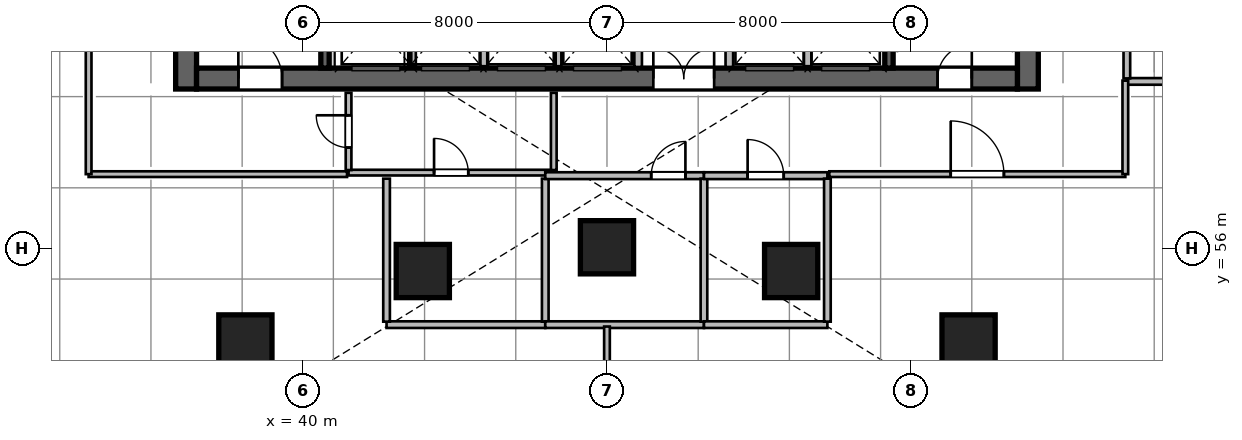
"""IFC4 building model, lengths in metres.
Left out: names, types, materials, properties, quantities, classifications, styles, units other than length and angle.
Written with IfcOpenShell. Run it as: python <this file> out.ifc"""

import sys

from ifc_helpers import new_model, si_unit, direction, frame, frame_2d, origin, origin_2d, place, context, subcontext, project, spatial, rectangle, circle, extrude, source, transform, mapped, element, fill, save


model = new_model("IFC4")
c1 = context("Model", 3, precision=1e-05, world=origin(), true_north=direction((0.0, 1.0)))
c2 = subcontext(c1, "Body", "Model", "MODEL_VIEW")
j1 = project(units=[si_unit("LENGTHUNIT", "METRE"), si_unit("PLANEANGLEUNIT", "RADIAN")], contexts=[c1])
p1 = place(None, origin())
s1 = spatial("IfcSite", under=j1, at=p1, CompositionType="ELEMENT")
p2 = place(p1, origin())
s2 = spatial("IfcBuilding", under=s1, at=p2, CompositionType="ELEMENT")
p3 = place(p2, frame((0.0, 0.0, 30.0)))
s3 = spatial("IfcBuildingStorey", under=s2, at=p3, CompositionType="ELEMENT", Elevation=30.0)
m1 = source(origin(), c2, "Body", "SweptSolid", [
    extrude(rectangle(XDim=12.0, YDim=0.55, at=frame_2d((6.0, 0.0))), origin(), (0.0, 0.0, 1.0), 5.4),
])
for number, where, z_axis, x_axis in (
    (1, (36.925, 60.2, 0.0), (0.0, 0.0, 1.0), (0.0, 1.0, 0.0)),
    (2, (59.075, 60.2, 0.0), (0.0, 0.0, 1.0), (0.0, 1.0, 0.0)),
):
    element("IfcWall", number, at=place(p3, frame(where, z_axis=z_axis, x_axis=x_axis)), inside=s3, PredefinedType="SHEAR", context=c2, shape_type="MappedRepresentation", body=[
        mapped(m1, transform((0.0, 0.0, 0.0), scale=1.0)),
    ])
m2 = source(origin(), c2, "Body", "SweptSolid", [
    extrude(rectangle(XDim=21.6, YDim=0.55, at=frame_2d((10.8, 0.0))), origin(), (0.0, 0.0, 1.0), 5.4),
])
p4 = place(p3, frame((37.2, 60.475, 0.0), z_axis=(0.0, 0.0, 1.0), x_axis=(1.0, 0.0, 0.0)))
e3 = element("IfcWall", 3, at=p4, inside=s3, PredefinedType="SHEAR", context=c2, shape_type="MappedRepresentation", body=[
    mapped(m2, transform((0.0, 0.0, 0.0), scale=1.0)),
])
p5 = place(p4, frame((1.1, 0.0, 0.0)))
e4 = element("IfcOpeningElement", 4, at=p5, cuts=e3, PredefinedType="OPENING", context=c2, shape_type="SweptSolid", body=[
    extrude(rectangle(XDim=1.15, YDim=2.15, at=frame_2d((0.575, 1.075))), frame((0.0, 0.285, 0.0), z_axis=(0.0, -1.0, 0.0), x_axis=(1.0, 0.0, 0.0)), (0.0, 0.0, 1.0), 0.57),
])
p6 = place(p4, frame((19.5, 0.0, 0.0)))
e5 = element("IfcOpeningElement", 5, at=p6, cuts=e3, PredefinedType="OPENING", context=c2, shape_type="SweptSolid", body=[
    extrude(rectangle(XDim=0.9, YDim=2.1, at=frame_2d((0.45, 1.05))), frame((0.0, 0.285, 0.0), z_axis=(0.0, -1.0, 0.0), x_axis=(1.0, 0.0, 0.0)), (0.0, 0.0, 1.0), 0.57),
])
p7 = place(p4, frame((12.02, 0.0, 0.0)))
e6 = element("IfcOpeningElement", 6, at=p7, cuts=e3, PredefinedType="OPENING", context=c2, shape_type="SweptSolid", body=[
    extrude(rectangle(XDim=1.6, YDim=2.15, at=frame_2d((0.8, 1.075))), frame((0.0, 0.285, 0.0), z_axis=(0.0, -1.0, 0.0), x_axis=(1.0, 0.0, 0.0)), (0.0, 0.0, 1.0), 0.57),
])
m3 = source(origin(), c2, "Body", "SweptSolid", [
    extrude(rectangle(XDim=10.9, YDim=0.22, at=frame_2d((5.45, 0.0))), origin(), (0.0, 0.0, 1.0), 5.4),
])
p8 = place(p3, frame((40.58, 60.75, 0.0), z_axis=(0.0, 0.0, 1.0), x_axis=(0.0, 1.0, 0.0)))
e7 = element("IfcWall", 7, at=p8, inside=s3, PredefinedType="SHEAR", context=c2, shape_type="MappedRepresentation", body=[
    mapped(m3, transform((0.0, 0.0, 0.0), scale=1.0)),
])
p9 = place(p3, frame((55.42, 60.75, 0.0), z_axis=(0.0, 0.0, 1.0), x_axis=(0.0, 1.0, 0.0)))
e8 = element("IfcWall", 8, at=p9, inside=s3, PredefinedType="SHEAR", context=c2, shape_type="MappedRepresentation", body=[
    mapped(m3, transform((0.0, 0.0, 0.0), scale=1.0)),
])
p10 = place(p9, frame((9.495, 0.0, 0.0)))
e9 = element("IfcOpeningElement", 9, at=p10, cuts=e8, PredefinedType="OPENING", context=c2, shape_type="SweptSolid", body=[
    extrude(rectangle(XDim=1.15, YDim=2.15, at=frame_2d((0.575, 1.075))), frame((0.0, 0.12, 0.0), z_axis=(0.0, -1.0, 0.0), x_axis=(1.0, 0.0, 0.0)), (0.0, 0.0, 1.0), 0.24),
])
m4 = source(origin(), c2, "Body", "SweptSolid", [
    extrude(circle(Radius=0.7, at=origin_2d()), origin(), (0.0, 0.0, 1.0), 5.4),
])
for number, where, z_axis, x_axis in (
    (10, (38.485, 53.558, 0.0), (0.0, 0.0, 1.0), (-0.289, 0.957, 0.0)),
    (11, (43.154, 55.411, 0.0), (0.0, 0.0, 1.0), (-0.143, 0.99, 0.0)),
    (12, (48.0, 56.036, 0.0), (0.0, 0.0, 1.0), (0.0, 1.0, 0.0)),
    (13, (52.846, 55.411, 0.0), (0.0, 0.0, 1.0), (0.143, 0.99, 0.0)),
    (14, (57.515, 53.558, 0.0), (0.0, 0.0, 1.0), (0.289, 0.957, 0.0)),
):
    element("IfcColumn", number, at=place(p3, frame(where, z_axis=z_axis, x_axis=x_axis)), inside=s3, PredefinedType="COLUMN", context=c2, shape_type="MappedRepresentation", body=[
        mapped(m4, transform((0.0, 0.0, 0.0), scale=1.0)),
    ])
m5 = source(origin(), c2, "Body", "SweptSolid", [
    extrude(rectangle(XDim=2.24, YDim=0.2, at=frame_2d((1.12, 0.0))), origin(), (0.0, 0.0, 1.0), 5.16),
])
for number, where, z_axis, x_axis in (
    (15, (48.82, 60.78, 0.0), (0.0, 0.0, 1.0), (0.0, 1.0, 0.0)),
    (16, (51.22, 60.78, 0.0), (0.0, 0.0, 1.0), (0.0, 1.0, 0.0)),
):
    element("IfcWall", number, at=place(p3, frame(where, z_axis=z_axis, x_axis=x_axis)), inside=s3, PredefinedType="SOLIDWALL", context=c2, shape_type="MappedRepresentation", body=[
        mapped(m5, transform((0.0, 0.0, 0.0), scale=1.0)),
    ])
m6 = source(origin(), c2, "Body", "SweptSolid", [
    extrude(rectangle(XDim=2.2, YDim=0.2, at=frame_2d((1.1, 0.0))), origin(), (0.0, 0.0, 1.0), 5.16),
])
for number, where, z_axis, x_axis in (
    (17, (42.87, 60.8, 0.0), (0.0, 0.0, 1.0), (0.0, 1.0, 0.0)),
    (18, (44.77, 60.8, 0.0), (0.0, 0.0, 1.0), (0.0, 1.0, 0.0)),
    (19, (46.7, 60.8, 0.0), (0.0, 0.0, 1.0), (0.0, 1.0, 0.0)),
    (20, (53.28, 60.8, 0.0), (0.0, 0.0, 1.0), (0.0, 1.0, 0.0)),
):
    element("IfcWall", number, at=place(p3, frame(where, z_axis=z_axis, x_axis=x_axis)), inside=s3, PredefinedType="SOLIDWALL", context=c2, shape_type="MappedRepresentation", body=[
        mapped(m6, transform((0.0, 0.0, 0.0), scale=1.0)),
    ])
m7 = source(origin(), c2, "Body", "SweptSolid", [
    extrude(rectangle(XDim=5.4, YDim=0.15, at=frame_2d((2.7, 0.0))), origin(), (0.0, 0.0, 1.0), 4.591),
])
p11 = place(p3, frame((41.2, 58.0, 0.0), z_axis=(0.0, 0.0, 1.0), x_axis=(1.0, 0.0, 0.0)))
e21 = element("IfcWall", 21, at=p11, inside=s3, PredefinedType="PARTITIONING", context=c2, shape_type="MappedRepresentation", body=[
    mapped(m7, transform((0.0, 0.0, 0.0), scale=1.0)),
])
p12 = place(p11, frame((2.25, 0.0, 0.0)))
e22 = element("IfcOpeningElement", 22, at=p12, cuts=e21, PredefinedType="OPENING", context=c2, shape_type="SweptSolid", body=[
    extrude(rectangle(XDim=0.9, YDim=2.08, at=frame_2d((0.45, 1.04))), frame((0.0, 0.085, 0.0), z_axis=(0.0, -1.0, 0.0), x_axis=(1.0, 0.0, 0.0)), (0.0, 0.0, 1.0), 0.17),
])
m8 = source(origin(), c2, "Body", "SweptSolid", [
    extrude(rectangle(XDim=2.033, YDim=0.15, at=frame_2d((1.016, 0.0))), origin(), (0.0, 0.0, 1.0), 5.16),
])
p13 = place(p3, frame((41.2, 58.067, 0.0), z_axis=(0.0, 0.0, 1.0), x_axis=(0.0, 1.0, 0.0)))
e23 = element("IfcWall", 23, at=p13, inside=s3, PredefinedType="PARTITIONING", context=c2, shape_type="MappedRepresentation", body=[
    mapped(m8, transform((0.0, 0.0, 0.0), scale=1.0)),
])
p14 = place(p13, frame((0.591, 0.0, 0.0)))
e24 = element("IfcOpeningElement", 24, at=p14, cuts=e23, PredefinedType="OPENING", context=c2, shape_type="SweptSolid", body=[
    extrude(rectangle(XDim=0.85, YDim=2.1, at=frame_2d((0.425, 1.05))), frame((0.0, 0.085, 0.0), z_axis=(0.0, -1.0, 0.0), x_axis=(1.0, 0.0, 0.0)), (0.0, 0.0, 1.0), 0.17),
])
p15 = place(p3, frame((46.6, 58.067, 0.0), z_axis=(0.0, 0.0, 1.0), x_axis=(0.0, 1.0, 0.0)))
e25 = element("IfcWall", 25, at=p15, inside=s3, PredefinedType="PARTITIONING", context=c2, shape_type="MappedRepresentation", body=[
    mapped(m8, transform((0.0, 0.0, 0.0), scale=1.0)),
])
m9 = source(origin(), c2, "Body", "SweptSolid", [
    extrude(rectangle(XDim=4.176, YDim=0.175, at=frame_2d((2.088, 0.0))), origin(), (0.0, 0.0, 1.0), 5.16),
])
p16 = place(p3, frame((42.2, 54.0, 0.0), z_axis=(0.0, 0.0, 1.0), x_axis=(1.0, 0.0, 0.0)))
e26 = element("IfcWall", 26, at=p16, inside=s3, PredefinedType="PARTITIONING", context=c2, shape_type="MappedRepresentation", body=[
    mapped(m9, transform((0.0, 0.0, 0.0), scale=1.0)),
])
m10 = source(origin(), c2, "Body", "SweptSolid", [
    extrude(rectangle(XDim=3.763, YDim=0.175, at=frame_2d((1.881, 0.0))), origin(), (0.0, 0.0, 1.0), 5.16),
])
for number, where, z_axis, x_axis in (
    (27, (42.2, 54.079, 0.0), (0.0, 0.0, 1.0), (0.0, 1.0, 0.0)),
    (28, (46.376, 54.079, 0.0), (0.0, 0.0, 1.0), (0.0, 1.0, 0.0)),
):
    element("IfcWall", number, at=place(p3, frame(where, z_axis=z_axis, x_axis=x_axis)), inside=s3, PredefinedType="PARTITIONING", context=c2, shape_type="MappedRepresentation", body=[
        mapped(m10, transform((0.0, 0.0, 0.0), scale=1.0)),
    ])
p17 = place(p3, frame((46.376, 54.0, 0.0), z_axis=(0.0, 0.0, 1.0), x_axis=(1.0, 0.0, 0.0)))
e29 = element("IfcWall", 29, at=p17, inside=s3, PredefinedType="PARTITIONING", context=c2, shape_type="MappedRepresentation", body=[
    mapped(m9, transform((0.0, 0.0, 0.0), scale=1.0)),
])
m11 = source(origin(), c2, "Body", "SweptSolid", [
    extrude(rectangle(XDim=4.176, YDim=0.18, at=frame_2d((2.088, 0.0))), origin(), (0.0, 0.0, 1.0), 5.16),
])
p18 = place(p3, frame((46.376, 57.92, 0.0), z_axis=(0.0, 0.0, 1.0), x_axis=(1.0, 0.0, 0.0)))
e30 = element("IfcWall", 30, at=p18, inside=s3, PredefinedType="PLUMBINGWALL", context=c2, shape_type="MappedRepresentation", body=[
    mapped(m11, transform((0.0, 0.0, 0.0), scale=1.0)),
])
p19 = place(p18, frame((2.788, 0.0, 0.0)))
e31 = element("IfcOpeningElement", 31, at=p19, cuts=e30, PredefinedType="OPENING", context=c2, shape_type="SweptSolid", body=[
    extrude(rectangle(XDim=0.9, YDim=2.08, at=frame_2d((0.45, 1.04))), frame((0.0, 0.1, 0.0), z_axis=(0.0, -1.0, 0.0), x_axis=(1.0, 0.0, 0.0)), (0.0, 0.0, 1.0), 0.2),
])
p20 = place(p3, frame((50.552, 54.079, 0.0), z_axis=(0.0, 0.0, 1.0), x_axis=(0.0, 1.0, 0.0)))
e32 = element("IfcWall", 32, at=p20, inside=s3, PredefinedType="PARTITIONING", context=c2, shape_type="MappedRepresentation", body=[
    mapped(m10, transform((0.0, 0.0, 0.0), scale=1.0)),
])
m12 = source(origin(), c2, "Body", "SweptSolid", [
    extrude(rectangle(XDim=3.248, YDim=0.175, at=frame_2d((1.624, 0.0))), origin(), (0.0, 0.0, 1.0), 5.16),
])
p21 = place(p3, frame((50.552, 54.0, 0.0), z_axis=(0.0, 0.0, 1.0), x_axis=(1.0, 0.0, 0.0)))
e33 = element("IfcWall", 33, at=p21, inside=s3, PredefinedType="PARTITIONING", context=c2, shape_type="MappedRepresentation", body=[
    mapped(m12, transform((0.0, 0.0, 0.0), scale=1.0)),
])
m13 = source(origin(), c2, "Body", "SweptSolid", [
    extrude(rectangle(XDim=3.248, YDim=0.18, at=frame_2d((1.624, 0.0))), origin(), (0.0, 0.0, 1.0), 5.16),
])
p22 = place(p3, frame((50.552, 57.92, 0.0), z_axis=(0.0, 0.0, 1.0), x_axis=(1.0, 0.0, 0.0)))
e34 = element("IfcWall", 34, at=p22, inside=s3, PredefinedType="PLUMBINGWALL", context=c2, shape_type="MappedRepresentation", body=[
    mapped(m13, transform((0.0, 0.0, 0.0), scale=1.0)),
])
p23 = place(p22, frame((1.149, 0.0, 0.0)))
e35 = element("IfcOpeningElement", 35, at=p23, cuts=e34, PredefinedType="OPENING", context=c2, shape_type="SweptSolid", body=[
    extrude(rectangle(XDim=0.95, YDim=2.12, at=frame_2d((0.475, 1.06))), frame((0.0, 0.1, 0.0), z_axis=(0.0, -1.0, 0.0), x_axis=(1.0, 0.0, 0.0)), (0.0, 0.0, 1.0), 0.2),
])
p24 = place(p3, frame((53.8, 54.079, 0.0), z_axis=(0.0, 0.0, 1.0), x_axis=(0.0, 1.0, 0.0)))
e36 = element("IfcWall", 36, at=p24, inside=s3, PredefinedType="PARTITIONING", context=c2, shape_type="MappedRepresentation", body=[
    mapped(m10, transform((0.0, 0.0, 0.0), scale=1.0)),
])
m14 = source(origin(), c2, "Body", "SweptSolid", [
    extrude(rectangle(XDim=9.82, YDim=0.175, at=frame_2d((4.91, 0.0))), origin(), (0.0, 0.0, 1.0), 5.16),
])
p25 = place(p3, frame((61.68, 60.4, 0.0), z_axis=(0.0, 0.0, 1.0), x_axis=(1.0, 0.0, 0.0)))
e37 = element("IfcWall", 37, at=p25, inside=s3, PredefinedType="PARTITIONING", context=c2, shape_type="MappedRepresentation", body=[
    mapped(m14, transform((0.0, 0.0, 0.0), scale=1.0)),
])
m15 = source(origin(), c2, "Body", "SweptSolid", [
    extrude(rectangle(XDim=7.443, YDim=0.175, at=frame_2d((3.721, 0.0))), origin(), (0.0, 0.0, 1.0), 5.16),
])
p26 = place(p3, frame((61.68, 60.479, 0.0), z_axis=(0.0, 0.0, 1.0), x_axis=(0.0, 1.0, 0.0)))
e38 = element("IfcWall", 38, at=p26, inside=s3, PredefinedType="PARTITIONING", context=c2, shape_type="MappedRepresentation", body=[
    mapped(m15, transform((0.0, 0.0, 0.0), scale=1.0)),
])
p27 = place(p26, frame((3.121, 0.0, 0.0)))
e39 = element("IfcOpeningElement", 39, at=p27, cuts=e38, PredefinedType="OPENING", context=c2, shape_type="SweptSolid", body=[
    extrude(rectangle(XDim=1.2, YDim=2.15, at=frame_2d((0.6, 1.075))), frame((0.0, 0.098, 0.0), z_axis=(0.0, -1.0, 0.0), x_axis=(1.0, 0.0, 0.0)), (0.0, 0.0, 1.0), 0.195),
])
m16 = source(origin(), c2, "Body", "SweptSolid", [
    extrude(rectangle(XDim=2.146, YDim=0.15, at=frame_2d((1.073, 0.0))), origin(), (0.0, 0.0, 1.0), 5.16),
])
p28 = place(p3, frame((48.0, 51.804, 0.0), z_axis=(0.0, 0.0, 1.0), x_axis=(0.0, 1.0, 0.0)))
e40 = element("IfcWall", 40, at=p28, inside=s3, PredefinedType="PARTITIONING", context=c2, shape_type="MappedRepresentation", body=[
    mapped(m16, transform((0.0, 0.0, 0.0), scale=1.0)),
])
m17 = source(origin(), c2, "Body", "SweptSolid", [
    extrude(rectangle(XDim=6.8, YDim=0.15, at=frame_2d((3.4, 0.0))), origin(), (0.0, 0.0, 1.0), 5.16),
])
p29 = place(p3, frame((34.36, 57.96, 0.0), z_axis=(0.0, 0.0, 1.0), x_axis=(1.0, 0.0, 0.0)))
e41 = element("IfcWall", 41, at=p29, inside=s3, PredefinedType="PARTITIONING", context=c2, shape_type="MappedRepresentation", body=[
    mapped(m17, transform((0.0, 0.0, 0.0), scale=1.0)),
])
m18 = source(origin(), c2, "Body", "SweptSolid", [
    extrude(rectangle(XDim=19.708, YDim=0.15, at=frame_2d((9.854, 0.0))), origin(), (0.0, 0.0, 1.0), 5.16),
])
p30 = place(p3, frame((34.36, 57.96, 0.0), z_axis=(0.0, 0.0, 1.0), x_axis=(0.0, 1.0, 0.0)))
e42 = element("IfcWall", 42, at=p30, inside=s3, PredefinedType="PARTITIONING", context=c2, shape_type="MappedRepresentation", body=[
    mapped(m18, transform((0.0, 0.0, 0.0), scale=1.0)),
])
p31 = place(p30, frame((9.154, 0.0, 0.0)))
e43 = element("IfcOpeningElement", 43, at=p31, cuts=e42, PredefinedType="OPENING", context=c2, shape_type="SweptSolid", body=[
    extrude(rectangle(XDim=1.4, YDim=2.15, at=frame_2d((0.7, 1.075))), frame((0.0, 0.085, 0.0), z_axis=(0.0, -1.0, 0.0), x_axis=(1.0, 0.0, 0.0)), (0.0, 0.0, 1.0), 0.17),
])
m19 = source(origin(), c2, "Body", "SweptSolid", [
    extrude(rectangle(XDim=7.79, YDim=0.15, at=frame_2d((3.895, 0.0))), origin(), (0.0, 0.0, 1.0), 4.591),
])
p32 = place(p3, frame((53.85, 57.96, 0.0), z_axis=(0.0, 0.0, 1.0), x_axis=(1.0, 0.0, 0.0)))
e44 = element("IfcWall", 44, at=p32, inside=s3, PredefinedType="PARTITIONING", context=c2, shape_type="MappedRepresentation", body=[
    mapped(m19, transform((0.0, 0.0, 0.0), scale=1.0)),
])
p33 = place(p32, frame((3.195, 0.0, 0.0)))
e45 = element("IfcOpeningElement", 45, at=p33, cuts=e44, PredefinedType="OPENING", context=c2, shape_type="SweptSolid", body=[
    extrude(rectangle(XDim=1.4, YDim=2.15, at=frame_2d((0.7, 1.075))), frame((0.0, 0.085, 0.0), z_axis=(0.0, -1.0, 0.0), x_axis=(1.0, 0.0, 0.0)), (0.0, 0.0, 1.0), 0.17),
])
m20 = source(origin(), c2, "Body", "SweptSolid", [
    extrude(rectangle(XDim=2.46, YDim=0.15, at=frame_2d((1.23, 0.0))), origin(), (0.0, 0.0, 1.0), 5.16),
])
p34 = place(p3, frame((61.64, 57.96, 0.0), z_axis=(0.0, 0.0, 1.0), x_axis=(0.0, 1.0, 0.0)))
e46 = element("IfcWall", 46, at=p34, inside=s3, PredefinedType="PARTITIONING", context=c2, shape_type="MappedRepresentation", body=[
    mapped(m20, transform((0.0, 0.0, 0.0), scale=1.0)),
])
m21 = source(origin(), c2, "Body", "SweptSolid", [
    extrude(rectangle(XDim=1.15, YDim=2.15, at=frame_2d((0.575, 1.075))), frame((0.0, 0.025, 0.0), z_axis=(0.0, -1.0, 0.0), x_axis=(1.0, 0.0, 0.0)), (0.0, 0.0, 1.0), 0.05),
])
p35 = place(p5, origin())
e47 = element("IfcDoor", 47, at=p35, inside=s3, OperationType="SINGLE_SWING_LEFT", PredefinedType="DOOR", context=c2, shape_type="MappedRepresentation", body=[
    mapped(m21, transform((0.0, 0.0, 0.0), scale=1.0)),
])
fill(e4, e47)
m22 = source(origin(), c2, "Body", "SweptSolid", [
    extrude(rectangle(XDim=0.9, YDim=2.1, at=frame_2d((0.45, 1.05))), frame((0.0, 0.025, 0.0), z_axis=(0.0, -1.0, 0.0), x_axis=(1.0, 0.0, 0.0)), (0.0, 0.0, 1.0), 0.05),
])
p36 = place(p6, origin())
e48 = element("IfcDoor", 48, at=p36, inside=s3, OperationType="SINGLE_SWING_RIGHT", PredefinedType="DOOR", context=c2, shape_type="MappedRepresentation", body=[
    mapped(m22, transform((0.0, 0.0, 0.0), scale=1.0)),
])
fill(e5, e48)
m23 = source(origin(), c2, "Body", "SweptSolid", [
    extrude(rectangle(XDim=1.6, YDim=2.15, at=frame_2d((0.8, 1.075))), frame((0.0, 0.025, 0.0), z_axis=(0.0, -1.0, 0.0), x_axis=(1.0, 0.0, 0.0)), (0.0, 0.0, 1.0), 0.05),
])
p37 = place(p7, origin())
e49 = element("IfcDoor", 49, at=p37, inside=s3, OperationType="DOUBLE_DOOR_SINGLE_SWING", PredefinedType="DOOR", context=c2, shape_type="MappedRepresentation", body=[
    mapped(m23, transform((0.0, 0.0, 0.0), scale=1.0)),
])
fill(e6, e49)
m24 = source(origin(), c2, "Body", "SweptSolid", [
    extrude(rectangle(XDim=0.85, YDim=2.1, at=frame_2d((0.425, 1.05))), frame((0.0, 0.025, 0.0), z_axis=(0.0, -1.0, 0.0), x_axis=(1.0, 0.0, 0.0)), (0.0, 0.0, 1.0), 0.05),
])
p38 = place(p14, origin())
e50 = element("IfcDoor", 50, at=p38, inside=s3, OperationType="SINGLE_SWING_RIGHT", PredefinedType="DOOR", context=c2, shape_type="MappedRepresentation", body=[
    mapped(m24, transform((0.0, 0.0, 0.0), scale=1.0)),
])
fill(e24, e50)
m25 = source(origin(), c2, "Body", "SweptSolid", [
    extrude(rectangle(XDim=0.9, YDim=2.08, at=frame_2d((0.45, 1.04))), frame((0.0, 0.025, 0.0), z_axis=(0.0, -1.0, 0.0), x_axis=(1.0, 0.0, 0.0)), (0.0, 0.0, 1.0), 0.05),
])
p39 = place(p12, origin())
e51 = element("IfcDoor", 51, at=p39, inside=s3, OperationType="SINGLE_SWING_LEFT", PredefinedType="DOOR", context=c2, shape_type="MappedRepresentation", body=[
    mapped(m25, transform((0.0, 0.0, 0.0), scale=1.0)),
])
fill(e22, e51)
p40 = place(p19, origin())
e52 = element("IfcDoor", 52, at=p40, inside=s3, OperationType="SINGLE_SWING_RIGHT", PredefinedType="DOOR", context=c2, shape_type="MappedRepresentation", body=[
    mapped(m25, transform((0.0, 0.0, 0.0), scale=1.0)),
])
fill(e31, e52)
m26 = source(origin(), c2, "Body", "SweptSolid", [
    extrude(rectangle(XDim=0.95, YDim=2.12, at=frame_2d((0.475, 1.06))), frame((0.0, 0.025, 0.0), z_axis=(0.0, -1.0, 0.0), x_axis=(1.0, 0.0, 0.0)), (0.0, 0.0, 1.0), 0.05),
])
p41 = place(p23, origin())
e53 = element("IfcDoor", 53, at=p41, inside=s3, OperationType="SINGLE_SWING_LEFT", PredefinedType="DOOR", context=c2, shape_type="MappedRepresentation", body=[
    mapped(m26, transform((0.0, 0.0, 0.0), scale=1.0)),
])
fill(e35, e53)
m27 = source(origin(), c2, "Body", "SweptSolid", [
    extrude(rectangle(XDim=1.4, YDim=2.15, at=frame_2d((0.7, 1.075))), frame((0.0, 0.025, 0.0), z_axis=(0.0, -1.0, 0.0), x_axis=(1.0, 0.0, 0.0)), (0.0, 0.0, 1.0), 0.05),
])
p42 = place(p33, origin())
e54 = element("IfcDoor", 54, at=p42, inside=s3, OperationType="SINGLE_SWING_LEFT", PredefinedType="DOOR", context=c2, shape_type="MappedRepresentation", body=[
    mapped(m27, transform((0.0, 0.0, 0.0), scale=1.0)),
])
fill(e45, e54)
save(model, sys.argv[1])
